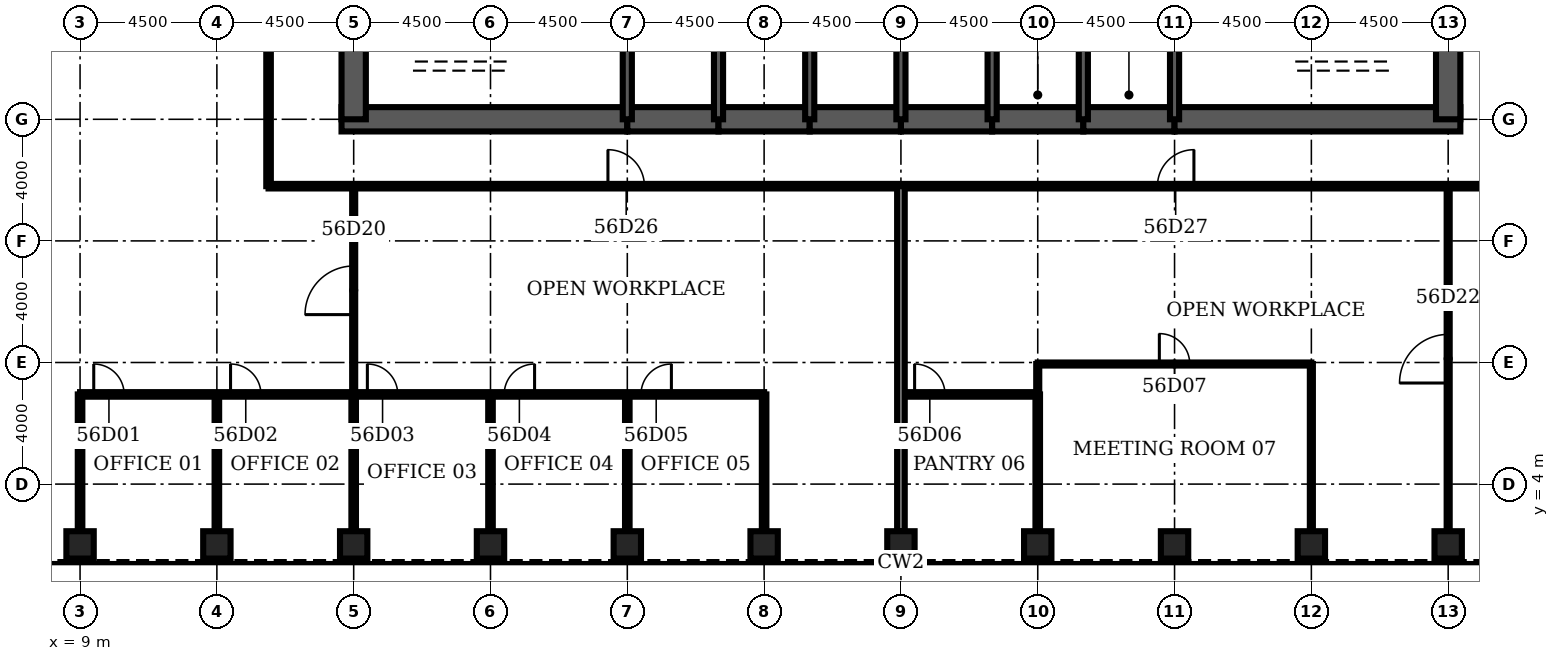
"""IFC4 building model, lengths in metres.
Left out: names, types, materials, properties, quantities, classifications, styles, units other than length and angle.
Written with IfcOpenShell. Run it as: python <this file> out.ifc"""

import sys

from ifc_helpers import new_model, si_unit, direction, frame, frame_2d, origin, origin_2d, place, context, subcontext, project, spatial, rectangle, hollow_rectangle, extrude, element, fill, save


model = new_model("IFC4")
c1 = context("Model", 3, precision=1e-05, world=origin(), true_north=direction((0.0, 1.0)))
c2 = subcontext(c1, "Body", "Model", "MODEL_VIEW")
j1 = project(units=[si_unit("LENGTHUNIT", "METRE"), si_unit("PLANEANGLEUNIT", "RADIAN")], contexts=[c1])
p1 = place(None, origin())
s1 = spatial("IfcSite", under=j1, at=p1, CompositionType="ELEMENT")
p2 = place(p1, origin())
s2 = spatial("IfcBuilding", under=s1, at=p2, CompositionType="ELEMENT")
p3 = place(p2, frame((0.0, 0.0, 248.8)))
s3 = spatial("IfcBuildingStorey", under=s2, at=p3, CompositionType="ELEMENT", Elevation=248.8)
for number, where, z_axis, x_axis in (
    (1, (9.0, 2.0, 0.0), (0.0, 0.0, 1.0), (0.0, 1.0, 0.0)),
    (2, (13.5, 2.0, 0.0), (0.0, 0.0, 1.0), (0.0, 1.0, 0.0)),
    (3, (18.0, 2.0, 0.0), (0.0, 0.0, 1.0), (0.0, 1.0, 0.0)),
    (4, (22.5, 2.0, 0.0), (0.0, 0.0, 1.0), (0.0, 1.0, 0.0)),
    (5, (27.0, 2.0, 0.0), (0.0, 0.0, 1.0), (0.0, 1.0, 0.0)),
    (6, (31.5, 2.0, 0.0), (0.0, 0.0, 1.0), (0.0, 1.0, 0.0)),
    (7, (36.0, 2.0, 0.0), (0.0, 0.0, 1.0), (0.0, 1.0, 0.0)),
    (8, (40.5, 2.0, 0.0), (0.0, 0.0, 1.0), (0.0, 1.0, 0.0)),
    (9, (45.0, 2.0, 0.0), (0.0, 0.0, 1.0), (0.0, 1.0, 0.0)),
    (10, (49.5, 2.0, 0.0), (0.0, 0.0, 1.0), (0.0, 1.0, 0.0)),
    (11, (54.0, 2.0, 0.0), (0.0, 0.0, 1.0), (0.0, 1.0, 0.0)),
):
    element("IfcColumn", number, at=place(p3, frame(where, z_axis=z_axis, x_axis=x_axis)), inside=s3, PredefinedType="COLUMN", context=c2, shape_type="SweptSolid", body=[
        extrude(hollow_rectangle(XDim=0.9, YDim=0.9, WallThickness=0.07, at=origin_2d()), origin(), (0.0, 0.0, 1.0), 4.2),
    ])
p4 = place(p3, frame((17.6, 16.0, 0.0), z_axis=(0.0, 0.0, 1.0), x_axis=(1.0, 0.0, 0.0)))
e12 = element("IfcWall", 12, at=p4, inside=s3, PredefinedType="SHEAR", context=c2, shape_type="SweptSolid", body=[
    extrude(rectangle(XDim=9.4, YDim=0.8, at=frame_2d((4.7, 0.0))), origin(), (0.0, 0.0, 1.0), 4.2),
])
for number, where, z_axis, x_axis in (
    (13, (27.0, 16.0, 0.0), (0.0, 0.0, 1.0), (1.0, 0.0, 0.0)),
    (14, (30.0, 16.0, 0.0), (0.0, 0.0, 1.0), (1.0, 0.0, 0.0)),
    (15, (33.0, 16.0, 0.0), (0.0, 0.0, 1.0), (1.0, 0.0, 0.0)),
    (16, (36.0, 16.0, 0.0), (0.0, 0.0, 1.0), (1.0, 0.0, 0.0)),
    (17, (39.0, 16.0, 0.0), (0.0, 0.0, 1.0), (1.0, 0.0, 0.0)),
    (18, (42.0, 16.0, 0.0), (0.0, 0.0, 1.0), (1.0, 0.0, 0.0)),
):
    element("IfcWall", number, at=place(p3, frame(where, z_axis=z_axis, x_axis=x_axis)), inside=s3, PredefinedType="SHEAR", context=c2, shape_type="SweptSolid", body=[
        extrude(rectangle(XDim=3.0, YDim=0.8, at=frame_2d((1.5, 0.0))), origin(), (0.0, 0.0, 1.0), 4.2),
    ])
p5 = place(p3, frame((45.0, 16.0, 0.0), z_axis=(0.0, 0.0, 1.0), x_axis=(1.0, 0.0, 0.0)))
e19 = element("IfcWall", 19, at=p5, inside=s3, PredefinedType="SHEAR", context=c2, shape_type="SweptSolid", body=[
    extrude(rectangle(XDim=9.4, YDim=0.8, at=frame_2d((4.7, 0.0))), origin(), (0.0, 0.0, 1.0), 4.2),
])
for number, where, z_axis, x_axis in (
    (20, (18.0, 19.2, 0.0), (0.0, 0.0, 1.0), (0.0, -1.0, 0.0)),
    (21, (54.0, 16.0, 0.0), (0.0, 0.0, 1.0), (0.0, 1.0, 0.0)),
):
    element("IfcWall", number, at=place(p3, frame(where, z_axis=z_axis, x_axis=x_axis)), inside=s3, PredefinedType="SHEAR", context=c2, shape_type="SweptSolid", body=[
        extrude(rectangle(XDim=3.2, YDim=0.8, at=frame_2d((1.6, 0.0))), origin(), (0.0, 0.0, 1.0), 4.2),
    ])
for number, where, z_axis, x_axis in (
    (22, (27.0, 16.0, 0.0), (0.0, 0.0, 1.0), (0.0, 1.0, 0.0)),
    (23, (30.0, 16.0, 0.0), (0.0, 0.0, 1.0), (0.0, 1.0, 0.0)),
    (24, (33.0, 16.0, 0.0), (0.0, 0.0, 1.0), (0.0, 1.0, 0.0)),
    (25, (36.0, 16.0, 0.0), (0.0, 0.0, 1.0), (0.0, 1.0, 0.0)),
    (26, (39.0, 16.0, 0.0), (0.0, 0.0, 1.0), (0.0, 1.0, 0.0)),
    (27, (42.0, 16.0, 0.0), (0.0, 0.0, 1.0), (0.0, 1.0, 0.0)),
    (28, (45.0, 16.0, 0.0), (0.0, 0.0, 1.0), (0.0, 1.0, 0.0)),
):
    element("IfcWall", number, at=place(p3, frame(where, z_axis=z_axis, x_axis=x_axis)), inside=s3, PredefinedType="SOLIDWALL", context=c2, shape_type="SweptSolid", body=[
        extrude(rectangle(XDim=3.2, YDim=0.3, at=frame_2d((1.6, 0.0))), origin(), (0.0, 0.0, 1.0), 4.2),
    ])
p6 = place(p3, frame((39.15, 17.35, 0.0), z_axis=(0.0, 0.0, 1.0), x_axis=(1.0, 0.0, 0.0)))
e29 = element("IfcWall", 29, at=p6, inside=s3, PredefinedType="SOLIDWALL", context=c2, shape_type="SweptSolid", body=[
    extrude(rectangle(XDim=2.7, YDim=0.3, at=frame_2d((1.35, 0.0))), origin(), (0.0, 0.0, 1.0), 4.04),
])
p7 = place(p6, frame((0.85, 0.0, 0.0)))
e30 = element("IfcOpeningElement", 30, at=p7, cuts=e29, PredefinedType="OPENING", context=c2, shape_type="SweptSolid", body=[
    extrude(rectangle(XDim=1.0, YDim=2.1, at=frame_2d((0.5, 1.05))), frame((0.0, 0.16, 0.0), z_axis=(0.0, -1.0, 0.0), x_axis=(1.0, 0.0, 0.0)), (0.0, 0.0, 1.0), 0.32),
])
p8 = place(p3, frame((42.15, 17.35, 0.0), z_axis=(0.0, 0.0, 1.0), x_axis=(1.0, 0.0, 0.0)))
e31 = element("IfcWall", 31, at=p8, inside=s3, PredefinedType="SOLIDWALL", context=c2, shape_type="SweptSolid", body=[
    extrude(rectangle(XDim=2.7, YDim=0.3, at=frame_2d((1.35, 0.0))), origin(), (0.0, 0.0, 1.0), 4.04),
])
p9 = place(p8, frame((0.85, 0.0, 0.0)))
e32 = element("IfcOpeningElement", 32, at=p9, cuts=e31, PredefinedType="OPENING", context=c2, shape_type="SweptSolid", body=[
    extrude(rectangle(XDim=1.0, YDim=2.1, at=frame_2d((0.5, 1.05))), frame((0.0, 0.16, 0.0), z_axis=(0.0, -1.0, 0.0), x_axis=(1.0, 0.0, 0.0)), (0.0, 0.0, 1.0), 0.32),
])
p10 = place(p3, frame((9.0, 6.95, 0.0), z_axis=(0.0, 0.0, 1.0), x_axis=(1.0, 0.0, 0.0)))
e33 = element("IfcWall", 33, at=p10, inside=s3, PredefinedType="PARTITIONING", context=c2, shape_type="SweptSolid", body=[
    extrude(rectangle(XDim=22.5, YDim=0.15, at=frame_2d((11.25, 0.0))), origin(), (0.0, 0.0, 1.0), 3.0),
])
p11 = place(p10, frame((0.45, 0.0, 0.0)))
e34 = element("IfcOpeningElement", 34, at=p11, cuts=e33, PredefinedType="OPENING", context=c2, shape_type="SweptSolid", body=[
    extrude(rectangle(XDim=1.0, YDim=2.1, at=frame_2d((0.5, 1.05))), frame((0.0, 0.085, 0.0), z_axis=(0.0, -1.0, 0.0), x_axis=(1.0, 0.0, 0.0)), (0.0, 0.0, 1.0), 0.17),
])
p12 = place(p10, frame((4.95, 0.0, 0.0)))
e35 = element("IfcOpeningElement", 35, at=p12, cuts=e33, PredefinedType="OPENING", context=c2, shape_type="SweptSolid", body=[
    extrude(rectangle(XDim=1.0, YDim=2.1, at=frame_2d((0.5, 1.05))), frame((0.0, 0.085, 0.0), z_axis=(0.0, -1.0, 0.0), x_axis=(1.0, 0.0, 0.0)), (0.0, 0.0, 1.0), 0.17),
])
p13 = place(p10, frame((9.45, 0.0, 0.0)))
e36 = element("IfcOpeningElement", 36, at=p13, cuts=e33, PredefinedType="OPENING", context=c2, shape_type="SweptSolid", body=[
    extrude(rectangle(XDim=1.0, YDim=2.1, at=frame_2d((0.5, 1.05))), frame((0.0, 0.085, 0.0), z_axis=(0.0, -1.0, 0.0), x_axis=(1.0, 0.0, 0.0)), (0.0, 0.0, 1.0), 0.17),
])
p14 = place(p10, frame((13.95, 0.0, 0.0)))
e37 = element("IfcOpeningElement", 37, at=p14, cuts=e33, PredefinedType="OPENING", context=c2, shape_type="SweptSolid", body=[
    extrude(rectangle(XDim=1.0, YDim=2.1, at=frame_2d((0.5, 1.05))), frame((0.0, 0.085, 0.0), z_axis=(0.0, -1.0, 0.0), x_axis=(1.0, 0.0, 0.0)), (0.0, 0.0, 1.0), 0.17),
])
p15 = place(p10, frame((18.45, 0.0, 0.0)))
e38 = element("IfcOpeningElement", 38, at=p15, cuts=e33, PredefinedType="OPENING", context=c2, shape_type="SweptSolid", body=[
    extrude(rectangle(XDim=1.0, YDim=2.1, at=frame_2d((0.5, 1.05))), frame((0.0, 0.085, 0.0), z_axis=(0.0, -1.0, 0.0), x_axis=(1.0, 0.0, 0.0)), (0.0, 0.0, 1.0), 0.17),
])
p16 = place(p3, frame((36.0, 6.95, 0.0), z_axis=(0.0, 0.0, 1.0), x_axis=(1.0, 0.0, 0.0)))
e39 = element("IfcWall", 39, at=p16, inside=s3, PredefinedType="PARTITIONING", context=c2, shape_type="SweptSolid", body=[
    extrude(rectangle(XDim=4.5, YDim=0.15, at=frame_2d((2.25, 0.0))), origin(), (0.0, 0.0, 1.0), 3.0),
])
p17 = place(p16, frame((0.45, 0.0, 0.0)))
e40 = element("IfcOpeningElement", 40, at=p17, cuts=e39, PredefinedType="OPENING", context=c2, shape_type="SweptSolid", body=[
    extrude(rectangle(XDim=1.0, YDim=2.1, at=frame_2d((0.5, 1.05))), frame((0.0, 0.085, 0.0), z_axis=(0.0, -1.0, 0.0), x_axis=(1.0, 0.0, 0.0)), (0.0, 0.0, 1.0), 0.17),
])
p18 = place(p3, frame((40.5, 7.95, 0.0), z_axis=(0.0, 0.0, 1.0), x_axis=(1.0, 0.0, 0.0)))
e41 = element("IfcWall", 41, at=p18, inside=s3, PredefinedType="PARTITIONING", context=c2, shape_type="SweptSolid", body=[
    extrude(rectangle(XDim=9.0, YDim=0.1, at=frame_2d((4.5, 0.0))), origin(), (0.0, 0.0, 1.0), 3.0),
])
p19 = place(p18, frame((4.0, 0.0, 0.0)))
e42 = element("IfcOpeningElement", 42, at=p19, cuts=e41, PredefinedType="OPENING", context=c2, shape_type="SweptSolid", body=[
    extrude(rectangle(XDim=1.0, YDim=2.1, at=frame_2d((0.5, 1.05))), frame((0.0, 0.06, 0.0), z_axis=(0.0, -1.0, 0.0), x_axis=(1.0, 0.0, 0.0)), (0.0, 0.0, 1.0), 0.12),
])
p20 = place(p3, frame((15.2, 13.8, 0.0), z_axis=(0.0, 0.0, 1.0), x_axis=(1.0, 0.0, 0.0)))
e43 = element("IfcWall", 43, at=p20, inside=s3, PredefinedType="PARTITIONING", context=c2, shape_type="SweptSolid", body=[
    extrude(rectangle(XDim=41.6, YDim=0.15, at=frame_2d((20.8, 0.0))), origin(), (0.0, 0.0, 1.0), 3.0),
])
p21 = place(p20, frame((11.163, 0.0, 0.0)))
e44 = element("IfcOpeningElement", 44, at=p21, cuts=e43, PredefinedType="OPENING", context=c2, shape_type="SweptSolid", body=[
    extrude(rectangle(XDim=1.2, YDim=2.1, at=frame_2d((0.6, 1.05))), frame((0.0, 0.085, 0.0), z_axis=(0.0, -1.0, 0.0), x_axis=(1.0, 0.0, 0.0)), (0.0, 0.0, 1.0), 0.17),
])
p22 = place(p20, frame((29.237, 0.0, 0.0)))
e45 = element("IfcOpeningElement", 45, at=p22, cuts=e43, PredefinedType="OPENING", context=c2, shape_type="SweptSolid", body=[
    extrude(rectangle(XDim=1.2, YDim=2.1, at=frame_2d((0.6, 1.05))), frame((0.0, 0.085, 0.0), z_axis=(0.0, -1.0, 0.0), x_axis=(1.0, 0.0, 0.0)), (0.0, 0.0, 1.0), 0.17),
])
for number, where, z_axis, x_axis in (
    (46, (9.0, 2.45, 0.0), (0.0, 0.0, 1.0), (0.0, 1.0, 0.0)),
    (47, (13.5, 2.45, 0.0), (0.0, 0.0, 1.0), (0.0, 1.0, 0.0)),
):
    element("IfcWall", number, at=place(p3, frame(where, z_axis=z_axis, x_axis=x_axis)), inside=s3, PredefinedType="PARTITIONING", context=c2, shape_type="SweptSolid", body=[
        extrude(rectangle(XDim=4.5, YDim=0.15, at=frame_2d((2.25, 0.0))), origin(), (0.0, 0.0, 1.0), 3.0),
    ])
p23 = place(p3, frame((15.2, 13.8, 0.0), z_axis=(0.0, 0.0, 1.0), x_axis=(0.0, 1.0, 0.0)))
e48 = element("IfcWall", 48, at=p23, inside=s3, PredefinedType="PARTITIONING", context=c2, shape_type="SweptSolid", body=[
    extrude(rectangle(XDim=18.6, YDim=0.15, at=frame_2d((9.3, 0.0))), origin(), (0.0, 0.0, 1.0), 3.0),
])
p24 = place(p23, frame((8.7, 0.0, 0.0)))
e49 = element("IfcOpeningElement", 49, at=p24, cuts=e48, PredefinedType="OPENING", context=c2, shape_type="SweptSolid", body=[
    extrude(rectangle(XDim=1.2, YDim=2.1, at=frame_2d((0.6, 1.05))), frame((0.0, 0.085, 0.0), z_axis=(0.0, -1.0, 0.0), x_axis=(1.0, 0.0, 0.0)), (0.0, 0.0, 1.0), 0.17),
])
p25 = place(p3, frame((18.0, 2.45, 0.0), z_axis=(0.0, 0.0, 1.0), x_axis=(0.0, 1.0, 0.0)))
e50 = element("IfcWall", 50, at=p25, inside=s3, PredefinedType="PARTITIONING", context=c2, shape_type="SweptSolid", body=[
    extrude(rectangle(XDim=4.5, YDim=0.15, at=frame_2d((2.25, 0.0))), origin(), (0.0, 0.0, 1.0), 3.0),
])
p26 = place(p3, frame((18.0, 6.95, 0.0), z_axis=(0.0, 0.0, 1.0), x_axis=(0.0, 1.0, 0.0)))
e51 = element("IfcWall", 51, at=p26, inside=s3, PredefinedType="PARTITIONING", context=c2, shape_type="SweptSolid", body=[
    extrude(rectangle(XDim=6.85, YDim=0.1, at=frame_2d((3.425, 0.0))), origin(), (0.0, 0.0, 1.0), 3.0),
])
p27 = place(p26, frame((2.625, 0.0, 0.0)))
e52 = element("IfcOpeningElement", 52, at=p27, cuts=e51, PredefinedType="OPENING", context=c2, shape_type="SweptSolid", body=[
    extrude(rectangle(XDim=1.6, YDim=2.1, at=frame_2d((0.8, 1.05))), frame((0.0, 0.06, 0.0), z_axis=(0.0, -1.0, 0.0), x_axis=(1.0, 0.0, 0.0)), (0.0, 0.0, 1.0), 0.12),
])
for number, where, z_axis, x_axis in (
    (53, (22.5, 2.45, 0.0), (0.0, 0.0, 1.0), (0.0, 1.0, 0.0)),
    (54, (27.0, 2.45, 0.0), (0.0, 0.0, 1.0), (0.0, 1.0, 0.0)),
    (55, (31.5, 2.45, 0.0), (0.0, 0.0, 1.0), (0.0, 1.0, 0.0)),
):
    element("IfcWall", number, at=place(p3, frame(where, z_axis=z_axis, x_axis=x_axis)), inside=s3, PredefinedType="PARTITIONING", context=c2, shape_type="SweptSolid", body=[
        extrude(rectangle(XDim=4.5, YDim=0.15, at=frame_2d((2.25, 0.0))), origin(), (0.0, 0.0, 1.0), 3.0),
    ])
p28 = place(p3, frame((36.0, 2.45, 0.0), z_axis=(0.0, 0.0, 1.0), x_axis=(0.0, 1.0, 0.0)))
e56 = element("IfcWall", 56, at=p28, inside=s3, PredefinedType="PARTITIONING", context=c2, shape_type="SweptSolid", body=[
    extrude(rectangle(XDim=11.35, YDim=0.25, at=frame_2d((5.675, 0.0))), origin(), (0.0, 0.0, 1.0), 3.0),
])
p29 = place(p3, frame((40.5, 2.45, 0.0), z_axis=(0.0, 0.0, 1.0), x_axis=(0.0, 1.0, 0.0)))
e57 = element("IfcWall", 57, at=p29, inside=s3, PredefinedType="PARTITIONING", context=c2, shape_type="SweptSolid", body=[
    extrude(rectangle(XDim=4.5, YDim=0.15, at=frame_2d((2.25, 0.0))), origin(), (0.0, 0.0, 1.0), 3.0),
])
p30 = place(p3, frame((40.5, 6.95, 0.0), z_axis=(0.0, 0.0, 1.0), x_axis=(0.0, 1.0, 0.0)))
e58 = element("IfcWall", 58, at=p30, inside=s3, PredefinedType="PARTITIONING", context=c2, shape_type="SweptSolid", body=[
    extrude(rectangle(XDim=1.0, YDim=0.1, at=frame_2d((0.5, 0.0))), origin(), (0.0, 0.0, 1.0), 3.0),
])
p31 = place(p3, frame((49.5, 2.45, 0.0), z_axis=(0.0, 0.0, 1.0), x_axis=(0.0, 1.0, 0.0)))
e59 = element("IfcWall", 59, at=p31, inside=s3, PredefinedType="PARTITIONING", context=c2, shape_type="SweptSolid", body=[
    extrude(rectangle(XDim=5.5, YDim=0.1, at=frame_2d((2.75, 0.0))), origin(), (0.0, 0.0, 1.0), 3.0),
])
p32 = place(p3, frame((54.0, 2.45, 0.0), z_axis=(0.0, 0.0, 1.0), x_axis=(0.0, 1.0, 0.0)))
e60 = element("IfcWall", 60, at=p32, inside=s3, PredefinedType="PARTITIONING", context=c2, shape_type="SweptSolid", body=[
    extrude(rectangle(XDim=11.35, YDim=0.1, at=frame_2d((5.675, 0.0))), origin(), (0.0, 0.0, 1.0), 3.0),
])
p33 = place(p32, frame((4.875, 0.0, 0.0)))
e61 = element("IfcOpeningElement", 61, at=p33, cuts=e60, PredefinedType="OPENING", context=c2, shape_type="SweptSolid", body=[
    extrude(rectangle(XDim=1.6, YDim=2.1, at=frame_2d((0.8, 1.05))), frame((0.0, 0.06, 0.0), z_axis=(0.0, -1.0, 0.0), x_axis=(1.0, 0.0, 0.0)), (0.0, 0.0, 1.0), 0.12),
])
p34 = place(p7, origin())
e62 = element("IfcDoor", 62, at=p34, inside=s3, OperationType="SINGLE_SWING_LEFT", PredefinedType="DOOR", context=c2, shape_type="SweptSolid", body=[
    extrude(rectangle(XDim=1.0, YDim=2.1, at=frame_2d((0.5, 1.05))), frame((0.0, 0.025, 0.0), z_axis=(0.0, -1.0, 0.0), x_axis=(1.0, 0.0, 0.0)), (0.0, 0.0, 1.0), 0.05),
])
fill(e30, e62)
p35 = place(p9, origin())
e63 = element("IfcDoor", 63, at=p35, inside=s3, OperationType="SINGLE_SWING_LEFT", PredefinedType="DOOR", context=c2, shape_type="SweptSolid", body=[
    extrude(rectangle(XDim=1.0, YDim=2.1, at=frame_2d((0.5, 1.05))), frame((0.0, 0.025, 0.0), z_axis=(0.0, -1.0, 0.0), x_axis=(1.0, 0.0, 0.0)), (0.0, 0.0, 1.0), 0.05),
])
fill(e32, e63)
p36 = place(p11, origin())
e64 = element("IfcDoor", 64, at=p36, inside=s3, OperationType="SINGLE_SWING_LEFT", PredefinedType="DOOR", context=c2, shape_type="SweptSolid", body=[
    extrude(rectangle(XDim=1.0, YDim=2.1, at=frame_2d((0.5, 1.05))), frame((0.0, 0.025, 0.0), z_axis=(0.0, -1.0, 0.0), x_axis=(1.0, 0.0, 0.0)), (0.0, 0.0, 1.0), 0.05),
])
fill(e34, e64)
p37 = place(p12, origin())
e65 = element("IfcDoor", 65, at=p37, inside=s3, OperationType="SINGLE_SWING_LEFT", PredefinedType="DOOR", context=c2, shape_type="SweptSolid", body=[
    extrude(rectangle(XDim=1.0, YDim=2.1, at=frame_2d((0.5, 1.05))), frame((0.0, 0.025, 0.0), z_axis=(0.0, -1.0, 0.0), x_axis=(1.0, 0.0, 0.0)), (0.0, 0.0, 1.0), 0.05),
])
fill(e35, e65)
p38 = place(p13, origin())
e66 = element("IfcDoor", 66, at=p38, inside=s3, OperationType="SINGLE_SWING_LEFT", PredefinedType="DOOR", context=c2, shape_type="SweptSolid", body=[
    extrude(rectangle(XDim=1.0, YDim=2.1, at=frame_2d((0.5, 1.05))), frame((0.0, 0.025, 0.0), z_axis=(0.0, -1.0, 0.0), x_axis=(1.0, 0.0, 0.0)), (0.0, 0.0, 1.0), 0.05),
])
fill(e36, e66)
p39 = place(p14, origin())
e67 = element("IfcDoor", 67, at=p39, inside=s3, OperationType="SINGLE_SWING_RIGHT", PredefinedType="DOOR", context=c2, shape_type="SweptSolid", body=[
    extrude(rectangle(XDim=1.0, YDim=2.1, at=frame_2d((0.5, 1.05))), frame((0.0, 0.025, 0.0), z_axis=(0.0, -1.0, 0.0), x_axis=(1.0, 0.0, 0.0)), (0.0, 0.0, 1.0), 0.05),
])
fill(e37, e67)
p40 = place(p15, origin())
e68 = element("IfcDoor", 68, at=p40, inside=s3, OperationType="SINGLE_SWING_RIGHT", PredefinedType="DOOR", context=c2, shape_type="SweptSolid", body=[
    extrude(rectangle(XDim=1.0, YDim=2.1, at=frame_2d((0.5, 1.05))), frame((0.0, 0.025, 0.0), z_axis=(0.0, -1.0, 0.0), x_axis=(1.0, 0.0, 0.0)), (0.0, 0.0, 1.0), 0.05),
])
fill(e38, e68)
p41 = place(p17, origin())
e69 = element("IfcDoor", 69, at=p41, inside=s3, OperationType="SINGLE_SWING_LEFT", PredefinedType="DOOR", context=c2, shape_type="SweptSolid", body=[
    extrude(rectangle(XDim=1.0, YDim=2.1, at=frame_2d((0.5, 1.05))), frame((0.0, 0.025, 0.0), z_axis=(0.0, -1.0, 0.0), x_axis=(1.0, 0.0, 0.0)), (0.0, 0.0, 1.0), 0.05),
])
fill(e40, e69)
p42 = place(p19, origin())
e70 = element("IfcDoor", 70, at=p42, inside=s3, OperationType="SINGLE_SWING_LEFT", PredefinedType="DOOR", context=c2, shape_type="SweptSolid", body=[
    extrude(rectangle(XDim=1.0, YDim=2.1, at=frame_2d((0.5, 1.05))), frame((0.0, 0.025, 0.0), z_axis=(0.0, -1.0, 0.0), x_axis=(1.0, 0.0, 0.0)), (0.0, 0.0, 1.0), 0.05),
])
fill(e42, e70)
p43 = place(p27, origin())
e71 = element("IfcDoor", 71, at=p43, inside=s3, OperationType="SINGLE_SWING_LEFT", PredefinedType="DOOR", context=c2, shape_type="SweptSolid", body=[
    extrude(rectangle(XDim=1.6, YDim=2.1, at=frame_2d((0.8, 1.05))), frame((0.0, 0.025, 0.0), z_axis=(0.0, -1.0, 0.0), x_axis=(1.0, 0.0, 0.0)), (0.0, 0.0, 1.0), 0.05),
])
fill(e52, e71)
p44 = place(p33, origin())
e72 = element("IfcDoor", 72, at=p44, inside=s3, OperationType="SINGLE_SWING_LEFT", PredefinedType="DOOR", context=c2, shape_type="SweptSolid", body=[
    extrude(rectangle(XDim=1.6, YDim=2.1, at=frame_2d((0.8, 1.05))), frame((0.0, 0.025, 0.0), z_axis=(0.0, -1.0, 0.0), x_axis=(1.0, 0.0, 0.0)), (0.0, 0.0, 1.0), 0.05),
])
fill(e61, e72)
p45 = place(p21, origin())
e73 = element("IfcDoor", 73, at=p45, inside=s3, OperationType="SINGLE_SWING_LEFT", PredefinedType="DOOR", context=c2, shape_type="SweptSolid", body=[
    extrude(rectangle(XDim=1.2, YDim=2.1, at=frame_2d((0.6, 1.05))), frame((0.0, 0.025, 0.0), z_axis=(0.0, -1.0, 0.0), x_axis=(1.0, 0.0, 0.0)), (0.0, 0.0, 1.0), 0.05),
])
fill(e44, e73)
p46 = place(p22, origin())
e74 = element("IfcDoor", 74, at=p46, inside=s3, OperationType="SINGLE_SWING_RIGHT", PredefinedType="DOOR", context=c2, shape_type="SweptSolid", body=[
    extrude(rectangle(XDim=1.2, YDim=2.1, at=frame_2d((0.6, 1.05))), frame((0.0, 0.025, 0.0), z_axis=(0.0, -1.0, 0.0), x_axis=(1.0, 0.0, 0.0)), (0.0, 0.0, 1.0), 0.05),
])
fill(e45, e74)
save(model, sys.argv[1])
